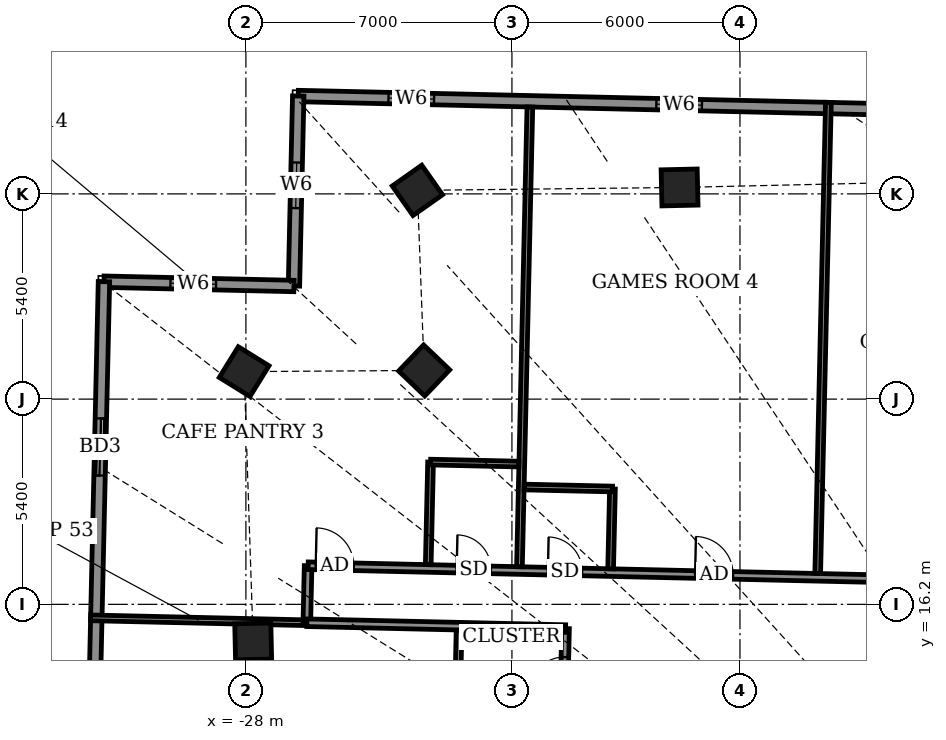
"""IFC4 building model, lengths in metres.
Left out: names, types, materials, properties, quantities, classifications, styles, units other than length and angle.
Written with IfcOpenShell. Run it as: python <this file> out.ifc"""

import sys

from ifc_helpers import new_model, si_unit, direction, frame, frame_2d, origin, origin_2d, place, context, subcontext, project, spatial, rectangle, extrude, element, fill, save


model = new_model("IFC4")
c1 = context("Model", 3, precision=1e-05, world=origin(), true_north=direction((0.0, 1.0)))
c2 = subcontext(c1, "Body", "Model", "MODEL_VIEW")
j1 = project(units=[si_unit("LENGTHUNIT", "METRE"), si_unit("PLANEANGLEUNIT", "RADIAN")], contexts=[c1])
p1 = place(None, origin())
s1 = spatial("IfcSite", under=j1, at=p1, CompositionType="ELEMENT")
p2 = place(p1, origin())
s2 = spatial("IfcBuilding", under=s1, at=p2, CompositionType="ELEMENT")
p3 = place(p2, frame((0.0, 0.0, 301.5)))
s3 = spatial("IfcBuildingStorey", under=s2, at=p3, CompositionType="ELEMENT", Elevation=301.5)
for number, where, z_axis, x_axis in (
    (1, (-16.589, 27.169, -0.55), (0.0, 0.0, 1.0), (-1.0, -0.023, 0.0)),
    (2, (-23.488, 27.093, -0.55), (0.0, 0.0, 1.0), (-0.818, -0.575, 0.0)),
    (3, (-23.309, 22.355, -0.55), (0.0, 0.0, 1.0), (-0.691, -0.723, 0.0)),
    (4, (-28.046, 22.324, -0.55), (0.0, 0.0, 1.0), (-0.527, -0.85, 0.0)),
    (5, (-27.808, 15.224, -0.55), (0.0, 0.0, 1.0), (0.023, -1.0, 0.0)),
):
    element("IfcColumn", number, at=place(p3, frame(where, z_axis=z_axis, x_axis=x_axis)), inside=s3, PredefinedType="COLUMN", context=c2, shape_type="SweptSolid", body=[
        extrude(rectangle(XDim=0.95, YDim=0.95, at=origin_2d()), origin(), (0.0, 0.0, 1.0), 4.6),
    ])
p4 = place(p3, frame((25.264, 28.397, 0.0), z_axis=(0.0, 0.0, 1.0), x_axis=(-0.999742391375, 0.022696935658, 0.0)))
e6 = element("IfcWall", 6, at=p4, inside=s3, PredefinedType="SOLIDWALL", context=c2, shape_type="SweptSolid", body=[
    extrude(rectangle(XDim=51.9, YDim=0.3, at=frame_2d((25.95, 0.0))), origin(), (0.0, 0.0, 1.0), 2.15),
])
p5 = place(p4, frame((2.072, 0.0, 0.0)))
e7 = element("IfcOpeningElement", 7, at=p5, cuts=e6, PredefinedType="OPENING", context=c2, shape_type="SweptSolid", body=[
    extrude(rectangle(XDim=1.5, YDim=2.0, at=frame_2d((0.75, 1.0))), frame((0.0, 0.16, 0.0), z_axis=(0.0, -1.0, 0.0), x_axis=(1.0, 0.0, 0.0)), (0.0, 0.0, 1.0), 0.32),
])
p6 = place(p4, frame((9.699, 0.0, 0.5)))
e8 = element("IfcOpeningElement", 8, at=p6, cuts=e6, PredefinedType="OPENING", context=c2, shape_type="SweptSolid", body=[
    extrude(rectangle(XDim=1.2, YDim=1.1, at=frame_2d((0.6, 0.55))), frame((0.0, 0.16, 0.0), z_axis=(0.0, -1.0, 0.0), x_axis=(1.0, 0.0, 0.0)), (0.0, 0.0, 1.0), 0.32),
])
p7 = place(p4, frame((17.577, 0.0, 0.0)))
e9 = element("IfcOpeningElement", 9, at=p7, cuts=e6, PredefinedType="OPENING", context=c2, shape_type="SweptSolid", body=[
    extrude(rectangle(XDim=1.5, YDim=2.0, at=frame_2d((0.75, 1.0))), frame((0.0, 0.16, 0.0), z_axis=(0.0, -1.0, 0.0), x_axis=(1.0, 0.0, 0.0)), (0.0, 0.0, 1.0), 0.32),
])
p8 = place(p4, frame((23.4, 0.0, 0.0)))
e10 = element("IfcOpeningElement", 10, at=p8, cuts=e6, PredefinedType="OPENING", context=c2, shape_type="SweptSolid", body=[
    extrude(rectangle(XDim=1.5, YDim=2.0, at=frame_2d((0.75, 1.0))), frame((0.0, 0.16, 0.0), z_axis=(0.0, -1.0, 0.0), x_axis=(1.0, 0.0, 0.0)), (0.0, 0.0, 1.0), 0.32),
])
p9 = place(p4, frame((29.0, 0.0, 0.0)))
e11 = element("IfcOpeningElement", 11, at=p9, cuts=e6, PredefinedType="OPENING", context=c2, shape_type="SweptSolid", body=[
    extrude(rectangle(XDim=1.5, YDim=2.0, at=frame_2d((0.75, 1.0))), frame((0.0, 0.16, 0.0), z_axis=(0.0, -1.0, 0.0), x_axis=(1.0, 0.0, 0.0)), (0.0, 0.0, 1.0), 0.32),
])
p10 = place(p4, frame((34.25, 0.0, 0.5)))
e12 = element("IfcOpeningElement", 12, at=p10, cuts=e6, PredefinedType="OPENING", context=c2, shape_type="SweptSolid", body=[
    extrude(rectangle(XDim=1.2, YDim=1.1, at=frame_2d((0.6, 0.55))), frame((0.0, 0.16, 0.0), z_axis=(0.0, -1.0, 0.0), x_axis=(1.0, 0.0, 0.0)), (0.0, 0.0, 1.0), 0.32),
])
p11 = place(p4, frame((41.275, 0.0, 0.5)))
e13 = element("IfcOpeningElement", 13, at=p11, cuts=e6, PredefinedType="OPENING", context=c2, shape_type="SweptSolid", body=[
    extrude(rectangle(XDim=1.2, YDim=1.1, at=frame_2d((0.6, 0.55))), frame((0.0, 0.16, 0.0), z_axis=(0.0, -1.0, 0.0), x_axis=(1.0, 0.0, 0.0)), (0.0, 0.0, 1.0), 0.32),
])
p12 = place(p4, frame((48.325, 0.0, 0.5)))
e14 = element("IfcOpeningElement", 14, at=p12, cuts=e6, PredefinedType="OPENING", context=c2, shape_type="SweptSolid", body=[
    extrude(rectangle(XDim=1.2, YDim=1.1, at=frame_2d((0.6, 0.55))), frame((0.0, 0.16, 0.0), z_axis=(0.0, -1.0, 0.0), x_axis=(1.0, 0.0, 0.0)), (0.0, 0.0, 1.0), 0.32),
])
p13 = place(p3, frame((-26.623, 29.575, 0.0), z_axis=(0.0, 0.0, 1.0), x_axis=(-0.022606059803, -0.999744450377, 0.0)))
e15 = element("IfcWall", 15, at=p13, inside=s3, PredefinedType="SOLIDWALL", context=c2, shape_type="SweptSolid", body=[
    extrude(rectangle(XDim=5.0, YDim=0.3, at=frame_2d((2.5, 0.0))), origin(), (0.0, 0.0, 1.0), 2.15),
])
p14 = place(p13, frame((1.75, 0.0, 0.5)))
e16 = element("IfcOpeningElement", 16, at=p14, cuts=e15, PredefinedType="OPENING", context=c2, shape_type="SweptSolid", body=[
    extrude(rectangle(XDim=1.2, YDim=1.1, at=frame_2d((0.6, 0.55))), frame((0.0, 0.16, 0.0), z_axis=(0.0, -1.0, 0.0), x_axis=(1.0, 0.0, 0.0)), (0.0, 0.0, 1.0), 0.32),
])
p15 = place(p3, frame((-26.736, 24.576, 0.0), z_axis=(0.0, 0.0, 1.0), x_axis=(-0.999740017489, 0.022801259434, 0.0)))
e17 = element("IfcWall", 17, at=p15, inside=s3, PredefinedType="SOLIDWALL", context=c2, shape_type="SweptSolid", body=[
    extrude(rectangle(XDim=5.0, YDim=0.3, at=frame_2d((2.5, 0.0))), origin(), (0.0, 0.0, 1.0), 2.25),
])
p16 = place(p15, frame((2.05, 0.0, 0.5)))
e18 = element("IfcOpeningElement", 18, at=p16, cuts=e17, PredefinedType="OPENING", context=c2, shape_type="SweptSolid", body=[
    extrude(rectangle(XDim=1.2, YDim=1.1, at=frame_2d((0.6, 0.55))), frame((0.0, 0.16, 0.0), z_axis=(0.0, -1.0, 0.0), x_axis=(1.0, 0.0, 0.0)), (0.0, 0.0, 1.0), 0.32),
])
p17 = place(p3, frame((-31.735, 24.69, 0.0), z_axis=(0.0, 0.0, 1.0), x_axis=(-0.022653555426, -0.999743375285, 0.0)))
e19 = element("IfcWall", 19, at=p17, inside=s3, PredefinedType="SOLIDWALL", context=c2, shape_type="SweptSolid", body=[
    extrude(rectangle(XDim=15.53, YDim=0.3, at=frame_2d((7.765, 0.0))), origin(), (0.0, 0.0, 1.0), 2.25),
])
p18 = place(p17, frame((3.6, 0.0, 0.0)))
e20 = element("IfcOpeningElement", 20, at=p18, cuts=e19, PredefinedType="OPENING", context=c2, shape_type="SweptSolid", body=[
    extrude(rectangle(XDim=1.5, YDim=2.0, at=frame_2d((0.75, 1.0))), frame((0.0, 0.16, 0.0), z_axis=(0.0, -1.0, 0.0), x_axis=(1.0, 0.0, 0.0)), (0.0, 0.0, 1.0), 0.32),
])
p19 = place(p17, frame((11.562, 0.0, 0.5)))
e21 = element("IfcOpeningElement", 21, at=p19, cuts=e19, PredefinedType="OPENING", context=c2, shape_type="SweptSolid", body=[
    extrude(rectangle(XDim=1.2, YDim=1.1, at=frame_2d((0.6, 0.55))), frame((0.0, 0.16, 0.0), z_axis=(0.0, -1.0, 0.0), x_axis=(1.0, 0.0, 0.0)), (0.0, 0.0, 1.0), 0.32),
])
p20 = place(p3, frame((-20.216, -12.081, 0.0), z_axis=(0.0, 0.0, 1.0), x_axis=(0.02267447203, 0.999742901109, 0.0)))
e22 = element("IfcWall", 22, at=p20, inside=s3, PredefinedType="PARTITIONING", context=c2, shape_type="SweptSolid", body=[
    extrude(rectangle(XDim=27.65, YDim=0.2, at=frame_2d((13.825, 0.0))), origin(), (0.0, 0.0, 1.0), 2.25),
])
p21 = place(p20, frame((22.638, 0.0, 0.0)))
e23 = element("IfcOpeningElement", 23, at=p21, cuts=e22, PredefinedType="OPENING", context=c2, shape_type="SweptSolid", body=[
    extrude(rectangle(XDim=1.0, YDim=2.1, at=frame_2d((0.5, 1.05))), frame((0.0, 0.11, 0.0), z_axis=(0.0, -1.0, 0.0), x_axis=(1.0, 0.0, 0.0)), (0.0, 0.0, 1.0), 0.22),
])
p22 = place(p20, frame((26.0, 0.0, 0.0)))
e24 = element("IfcOpeningElement", 24, at=p22, cuts=e22, PredefinedType="OPENING", context=c2, shape_type="SweptSolid", body=[
    extrude(rectangle(XDim=0.9, YDim=2.1, at=frame_2d((0.45, 1.05))), frame((0.0, 0.11, 0.0), z_axis=(0.0, -1.0, 0.0), x_axis=(1.0, 0.0, 0.0)), (0.0, 0.0, 1.0), 0.22),
])
p23 = place(p20, frame((15.55, 0.0, 0.0)))
e25 = element("IfcOpeningElement", 25, at=p23, cuts=e22, PredefinedType="OPENING", context=c2, shape_type="SweptSolid", body=[
    extrude(rectangle(XDim=1.0, YDim=2.1, at=frame_2d((0.5, 1.05))), frame((0.0, 0.11, 0.0), z_axis=(0.0, -1.0, 0.0), x_axis=(1.0, 0.0, 0.0)), (0.0, 0.0, 1.0), 0.22),
])
p24 = place(p20, frame((19.375, 0.0, 0.0)))
e26 = element("IfcOpeningElement", 26, at=p24, cuts=e22, PredefinedType="OPENING", context=c2, shape_type="SweptSolid", body=[
    extrude(rectangle(XDim=0.9, YDim=2.1, at=frame_2d((0.45, 1.05))), frame((0.0, 0.11, 0.0), z_axis=(0.0, -1.0, 0.0), x_axis=(1.0, 0.0, 0.0)), (0.0, 0.0, 1.0), 0.22),
])
p25 = place(p20, frame((11.075, 0.0, 0.0)))
e27 = element("IfcOpeningElement", 27, at=p25, cuts=e22, PredefinedType="OPENING", context=c2, shape_type="SweptSolid", body=[
    extrude(rectangle(XDim=1.0, YDim=2.1, at=frame_2d((0.5, 1.05))), frame((0.0, 0.11, 0.0), z_axis=(0.0, -1.0, 0.0), x_axis=(1.0, 0.0, 0.0)), (0.0, 0.0, 1.0), 0.22),
])
p26 = place(p20, frame((8.025, 0.0, 0.0)))
e28 = element("IfcOpeningElement", 28, at=p26, cuts=e22, PredefinedType="OPENING", context=c2, shape_type="SweptSolid", body=[
    extrude(rectangle(XDim=0.9, YDim=2.1, at=frame_2d((0.45, 1.05))), frame((0.0, 0.11, 0.0), z_axis=(0.0, -1.0, 0.0), x_axis=(1.0, 0.0, 0.0)), (0.0, 0.0, 1.0), 0.22),
])
p27 = place(p20, frame((1.937, 0.0, 0.0)))
e29 = element("IfcOpeningElement", 29, at=p27, cuts=e22, PredefinedType="OPENING", context=c2, shape_type="SweptSolid", body=[
    extrude(rectangle(XDim=1.0, YDim=2.1, at=frame_2d((0.5, 1.05))), frame((0.0, 0.11, 0.0), z_axis=(0.0, -1.0, 0.0), x_axis=(1.0, 0.0, 0.0)), (0.0, 0.0, 1.0), 0.22),
])
p28 = place(p20, frame((5.625, 0.0, 0.0)))
e30 = element("IfcOpeningElement", 30, at=p28, cuts=e22, PredefinedType="OPENING", context=c2, shape_type="SweptSolid", body=[
    extrude(rectangle(XDim=0.9, YDim=2.1, at=frame_2d((0.45, 1.05))), frame((0.0, 0.11, 0.0), z_axis=(0.0, -1.0, 0.0), x_axis=(1.0, 0.0, 0.0)), (0.0, 0.0, 1.0), 0.22),
])
p29 = place(p3, frame((-22.443, 13.226, 0.0), z_axis=(0.0, 0.0, 1.0), x_axis=(0.022615284993, 0.999744241736, 0.0)))
e31 = element("IfcWall", 31, at=p29, inside=s3, PredefinedType="PARTITIONING", context=c2, shape_type="SweptSolid", body=[
    extrude(rectangle(XDim=2.299, YDim=0.15, at=frame_2d((1.15, 0.0))), origin(), (0.0, 0.0, 1.0), 2.45),
])
p30 = place(p3, frame((-32.086, 15.845, 0.0), z_axis=(0.0, 0.0, 1.0), x_axis=(0.999743823458, -0.022633768064, 0.0)))
e32 = element("IfcWall", 32, at=p30, inside=s3, PredefinedType="PARTITIONING", context=c2, shape_type="SweptSolid", body=[
    extrude(rectangle(XDim=5.695, YDim=0.15, at=frame_2d((2.848, 0.0))), origin(), (0.0, 0.0, 1.0), 2.25),
])
p31 = place(p3, frame((-26.397, 15.716, 0.0), z_axis=(0.0, 0.0, 1.0), x_axis=(0.022617910375, 0.999744182344, 0.0)))
e33 = element("IfcWall", 33, at=p31, inside=s3, PredefinedType="PARTITIONING", context=c2, shape_type="SweptSolid", body=[
    extrude(rectangle(XDim=1.5, YDim=0.2, at=frame_2d((0.75, 0.0))), origin(), (0.0, 0.0, 1.0), 2.45),
])
p32 = place(p3, frame((-26.396, 15.716, 0.0), z_axis=(0.0, 0.0, 1.0), x_axis=(0.999743996894, -0.022626106023, 0.0)))
e34 = element("IfcWall", 34, at=p32, inside=s3, PredefinedType="PARTITIONING", context=c2, shape_type="SweptSolid", body=[
    extrude(rectangle(XDim=6.809, YDim=0.2, at=frame_2d((3.404, 0.0))), origin(), (0.0, 0.0, 1.0), 2.25),
])
p33 = place(p3, frame((-26.362, 17.216, 0.0), z_axis=(0.0, 0.0, 1.0), x_axis=(0.999742445627, -0.022694545867, 0.0)))
e35 = element("IfcWall", 35, at=p33, inside=s3, PredefinedType="PARTITIONING", context=c2, shape_type="SweptSolid", body=[
    extrude(rectangle(XDim=54.509, YDim=0.2, at=frame_2d((27.255, 0.0))), origin(), (0.0, 0.0, 1.0), 2.1),
])
p34 = place(p33, frame((50.584, 0.0, 0.0)))
e36 = element("IfcOpeningElement", 36, at=p34, cuts=e35, PredefinedType="OPENING", context=c2, shape_type="SweptSolid", body=[
    extrude(rectangle(XDim=1.0, YDim=2.1, at=frame_2d((0.5, 1.05))), frame((0.0, 0.11, 0.0), z_axis=(0.0, -1.0, 0.0), x_axis=(1.0, 0.0, 0.0)), (0.0, 0.0, 1.0), 0.22),
])
p35 = place(p33, frame((44.509, 0.0, 0.0)))
e37 = element("IfcOpeningElement", 37, at=p35, cuts=e35, PredefinedType="OPENING", context=c2, shape_type="SweptSolid", body=[
    extrude(rectangle(XDim=0.9, YDim=2.1, at=frame_2d((0.45, 1.05))), frame((0.0, 0.11, 0.0), z_axis=(0.0, -1.0, 0.0), x_axis=(1.0, 0.0, 0.0)), (0.0, 0.0, 1.0), 0.22),
])
p36 = place(p33, frame((38.734, 0.0, 0.0)))
e38 = element("IfcOpeningElement", 38, at=p36, cuts=e35, PredefinedType="OPENING", context=c2, shape_type="SweptSolid", body=[
    extrude(rectangle(XDim=1.0, YDim=2.1, at=frame_2d((0.5, 1.05))), frame((0.0, 0.11, 0.0), z_axis=(0.0, -1.0, 0.0), x_axis=(1.0, 0.0, 0.0)), (0.0, 0.0, 1.0), 0.22),
])
p37 = place(p33, frame((33.034, 0.0, 0.0)))
e39 = element("IfcOpeningElement", 39, at=p37, cuts=e35, PredefinedType="OPENING", context=c2, shape_type="SweptSolid", body=[
    extrude(rectangle(XDim=0.9, YDim=2.1, at=frame_2d((0.45, 1.05))), frame((0.0, 0.11, 0.0), z_axis=(0.0, -1.0, 0.0), x_axis=(1.0, 0.0, 0.0)), (0.0, 0.0, 1.0), 0.22),
])
p38 = place(p33, frame((25.559, 0.0, 0.0)))
e40 = element("IfcOpeningElement", 40, at=p38, cuts=e35, PredefinedType="OPENING", context=c2, shape_type="SweptSolid", body=[
    extrude(rectangle(XDim=0.9, YDim=2.1, at=frame_2d((0.45, 1.05))), frame((0.0, 0.11, 0.0), z_axis=(0.0, -1.0, 0.0), x_axis=(1.0, 0.0, 0.0)), (0.0, 0.0, 1.0), 0.22),
])
p39 = place(p33, frame((22.884, 0.0, 0.0)))
e41 = element("IfcOpeningElement", 41, at=p39, cuts=e35, PredefinedType="OPENING", context=c2, shape_type="SweptSolid", body=[
    extrude(rectangle(XDim=0.9, YDim=2.1, at=frame_2d((0.45, 1.05))), frame((0.0, 0.11, 0.0), z_axis=(0.0, -1.0, 0.0), x_axis=(1.0, 0.0, 0.0)), (0.0, 0.0, 1.0), 0.22),
])
p40 = place(p33, frame((16.009, 0.0, 0.0)))
e42 = element("IfcOpeningElement", 42, at=p40, cuts=e35, PredefinedType="OPENING", context=c2, shape_type="SweptSolid", body=[
    extrude(rectangle(XDim=1.0, YDim=2.1, at=frame_2d((0.5, 1.05))), frame((0.0, 0.11, 0.0), z_axis=(0.0, -1.0, 0.0), x_axis=(1.0, 0.0, 0.0)), (0.0, 0.0, 1.0), 0.22),
])
p41 = place(p33, frame((10.184, 0.0, 0.0)))
e43 = element("IfcOpeningElement", 43, at=p41, cuts=e35, PredefinedType="OPENING", context=c2, shape_type="SweptSolid", body=[
    extrude(rectangle(XDim=1.0, YDim=2.1, at=frame_2d((0.5, 1.05))), frame((0.0, 0.11, 0.0), z_axis=(0.0, -1.0, 0.0), x_axis=(1.0, 0.0, 0.0)), (0.0, 0.0, 1.0), 0.22),
])
p42 = place(p33, frame((6.309, 0.0, 0.0)))
e44 = element("IfcOpeningElement", 44, at=p42, cuts=e35, PredefinedType="OPENING", context=c2, shape_type="SweptSolid", body=[
    extrude(rectangle(XDim=0.9, YDim=2.1, at=frame_2d((0.45, 1.05))), frame((0.0, 0.11, 0.0), z_axis=(0.0, -1.0, 0.0), x_axis=(1.0, 0.0, 0.0)), (0.0, 0.0, 1.0), 0.22),
])
p43 = place(p33, frame((0.2, 0.0, 0.0)))
e45 = element("IfcOpeningElement", 45, at=p43, cuts=e35, PredefinedType="OPENING", context=c2, shape_type="SweptSolid", body=[
    extrude(rectangle(XDim=1.0, YDim=2.1, at=frame_2d((0.5, 1.05))), frame((0.0, 0.11, 0.0), z_axis=(0.0, -1.0, 0.0), x_axis=(1.0, 0.0, 0.0)), (0.0, 0.0, 1.0), 0.22),
])
p44 = place(p33, frame((3.909, 0.0, 0.0)))
e46 = element("IfcOpeningElement", 46, at=p44, cuts=e35, PredefinedType="OPENING", context=c2, shape_type="SweptSolid", body=[
    extrude(rectangle(XDim=0.9, YDim=2.1, at=frame_2d((0.45, 1.05))), frame((0.0, 0.11, 0.0), z_axis=(0.0, -1.0, 0.0), x_axis=(1.0, 0.0, 0.0)), (0.0, 0.0, 1.0), 0.22),
])
p45 = place(p3, frame((-23.202, 17.244, 0.0), z_axis=(0.0, 0.0, 1.0), x_axis=(0.022515998029, 0.999746482781, 0.0)))
e47 = element("IfcWall", 47, at=p45, inside=s3, PredefinedType="PARTITIONING", context=c2, shape_type="SweptSolid", body=[
    extrude(rectangle(XDim=2.7, YDim=0.15, at=frame_2d((1.35, 0.0))), origin(), (0.0, 0.0, 1.0), 2.25),
])
p46 = place(p3, frame((-20.802, 17.19, 0.0), z_axis=(0.0, 0.0, 1.0), x_axis=(0.022637991173, 0.99974372784, 0.0)))
e48 = element("IfcWall", 48, at=p46, inside=s3, PredefinedType="PARTITIONING", context=c2, shape_type="SweptSolid", body=[
    extrude(rectangle(XDim=12.1, YDim=0.15, at=frame_2d((6.05, 0.0))), origin(), (0.0, 0.0, 1.0), 2.15),
])
p47 = place(p3, frame((-18.403, 17.135, 0.0), z_axis=(0.0, 0.0, 1.0), x_axis=(0.022895647347, 0.999737860308, 0.0)))
e49 = element("IfcWall", 49, at=p47, inside=s3, PredefinedType="PARTITIONING", context=c2, shape_type="SweptSolid", body=[
    extrude(rectangle(XDim=2.101, YDim=0.15, at=frame_2d((1.05, 0.0))), origin(), (0.0, 0.0, 1.0), 2.15),
])
p48 = place(p3, frame((-12.954, 17.012, 0.0), z_axis=(0.0, 0.0, 1.0), x_axis=(0.022663260168, 0.999743155335, 0.0)))
e50 = element("IfcWall", 50, at=p48, inside=s3, PredefinedType="PARTITIONING", context=c2, shape_type="SweptSolid", body=[
    extrude(rectangle(XDim=12.399, YDim=0.15, at=frame_2d((6.2, 0.0))), origin(), (0.0, 0.0, 1.0), 2.15),
])
p49 = place(p3, frame((-20.68, 19.287, 0.0), z_axis=(0.0, 0.0, 1.0), x_axis=(0.999749954681, -0.022361308448, 0.0)))
e51 = element("IfcWall", 51, at=p49, inside=s3, PredefinedType="PARTITIONING", context=c2, shape_type="SweptSolid", body=[
    extrude(rectangle(XDim=2.325, YDim=0.15, at=frame_2d((1.163, 0.0))), origin(), (0.0, 0.0, 1.0), 2.15),
])
p50 = place(p3, frame((-23.141, 19.943, 0.0), z_axis=(0.0, 0.0, 1.0), x_axis=(0.999750007167, -0.022358961731, 0.0)))
e52 = element("IfcWall", 52, at=p50, inside=s3, PredefinedType="PARTITIONING", context=c2, shape_type="SweptSolid", body=[
    extrude(rectangle(XDim=2.326, YDim=0.15, at=frame_2d((1.163, 0.0))), origin(), (0.0, 0.0, 1.0), 2.45),
])
p51 = place(p11, origin())
e53 = element("IfcWindow", 53, at=p51, inside=s3, PartitioningType="SINGLE_PANEL", PredefinedType="WINDOW", context=c2, shape_type="SweptSolid", body=[
    extrude(rectangle(XDim=1.2, YDim=1.1, at=frame_2d((0.6, 0.55))), frame((0.0, 0.03, 0.0), z_axis=(0.0, -1.0, 0.0), x_axis=(1.0, 0.0, 0.0)), (0.0, 0.0, 1.0), 0.06),
])
fill(e13, e53)
p52 = place(p12, origin())
e54 = element("IfcWindow", 54, at=p52, inside=s3, PartitioningType="SINGLE_PANEL", PredefinedType="WINDOW", context=c2, shape_type="SweptSolid", body=[
    extrude(rectangle(XDim=1.2, YDim=1.1, at=frame_2d((0.6, 0.55))), frame((0.0, 0.03, 0.0), z_axis=(0.0, -1.0, 0.0), x_axis=(1.0, 0.0, 0.0)), (0.0, 0.0, 1.0), 0.06),
])
fill(e14, e54)
p53 = place(p14, origin())
e55 = element("IfcWindow", 55, at=p53, inside=s3, PartitioningType="SINGLE_PANEL", PredefinedType="WINDOW", context=c2, shape_type="SweptSolid", body=[
    extrude(rectangle(XDim=1.2, YDim=1.1, at=frame_2d((0.6, 0.55))), frame((0.0, 0.03, 0.0), z_axis=(0.0, -1.0, 0.0), x_axis=(1.0, 0.0, 0.0)), (0.0, 0.0, 1.0), 0.06),
])
fill(e16, e55)
p54 = place(p16, origin())
e56 = element("IfcWindow", 56, at=p54, inside=s3, PartitioningType="SINGLE_PANEL", PredefinedType="WINDOW", context=c2, shape_type="SweptSolid", body=[
    extrude(rectangle(XDim=1.2, YDim=1.1, at=frame_2d((0.6, 0.55))), frame((0.0, 0.03, 0.0), z_axis=(0.0, -1.0, 0.0), x_axis=(1.0, 0.0, 0.0)), (0.0, 0.0, 1.0), 0.06),
])
fill(e18, e56)
p55 = place(p18, origin())
e57 = element("IfcDoor", 57, at=p55, inside=s3, OperationType="SLIDING_TO_LEFT", PredefinedType="DOOR", context=c2, shape_type="SweptSolid", body=[
    extrude(rectangle(XDim=1.5, YDim=2.0, at=frame_2d((0.75, 1.0))), frame((0.0, 0.025, 0.0), z_axis=(0.0, -1.0, 0.0), x_axis=(1.0, 0.0, 0.0)), (0.0, 0.0, 1.0), 0.05),
])
fill(e20, e57)
p56 = place(p41, origin())
e58 = element("IfcDoor", 58, at=p56, inside=s3, OperationType="SINGLE_SWING_LEFT", PredefinedType="DOOR", context=c2, shape_type="SweptSolid", body=[
    extrude(rectangle(XDim=1.0, YDim=2.1, at=frame_2d((0.5, 1.05))), frame((0.0, 0.025, 0.0), z_axis=(0.0, -1.0, 0.0), x_axis=(1.0, 0.0, 0.0)), (0.0, 0.0, 1.0), 0.05),
])
fill(e43, e58)
p57 = place(p42, origin())
e59 = element("IfcDoor", 59, at=p57, inside=s3, OperationType="SINGLE_SWING_RIGHT", PredefinedType="DOOR", context=c2, shape_type="SweptSolid", body=[
    extrude(rectangle(XDim=0.9, YDim=2.1, at=frame_2d((0.45, 1.05))), frame((0.0, 0.025, 0.0), z_axis=(0.0, -1.0, 0.0), x_axis=(1.0, 0.0, 0.0)), (0.0, 0.0, 1.0), 0.05),
])
fill(e44, e59)
p58 = place(p43, origin())
e60 = element("IfcDoor", 60, at=p58, inside=s3, OperationType="SINGLE_SWING_RIGHT", PredefinedType="DOOR", context=c2, shape_type="SweptSolid", body=[
    extrude(rectangle(XDim=1.0, YDim=2.1, at=frame_2d((0.5, 1.05))), frame((0.0, 0.025, 0.0), z_axis=(0.0, -1.0, 0.0), x_axis=(1.0, 0.0, 0.0)), (0.0, 0.0, 1.0), 0.05),
])
fill(e45, e60)
p59 = place(p44, origin())
e61 = element("IfcDoor", 61, at=p59, inside=s3, OperationType="SINGLE_SWING_LEFT", PredefinedType="DOOR", context=c2, shape_type="SweptSolid", body=[
    extrude(rectangle(XDim=0.9, YDim=2.1, at=frame_2d((0.45, 1.05))), frame((0.0, 0.025, 0.0), z_axis=(0.0, -1.0, 0.0), x_axis=(1.0, 0.0, 0.0)), (0.0, 0.0, 1.0), 0.05),
])
fill(e46, e61)
p60 = place(p22, origin())
e62 = element("IfcDoor", 62, at=p60, inside=s3, OperationType="SINGLE_SWING_RIGHT", PredefinedType="DOOR", context=c2, shape_type="SweptSolid", body=[
    extrude(rectangle(XDim=0.9, YDim=2.1, at=frame_2d((0.45, 1.05))), frame((0.0, 0.025, 0.0), z_axis=(0.0, -1.0, 0.0), x_axis=(1.0, 0.0, 0.0)), (0.0, 0.0, 1.0), 0.05),
])
fill(e24, e62)
save(model, sys.argv[1])
